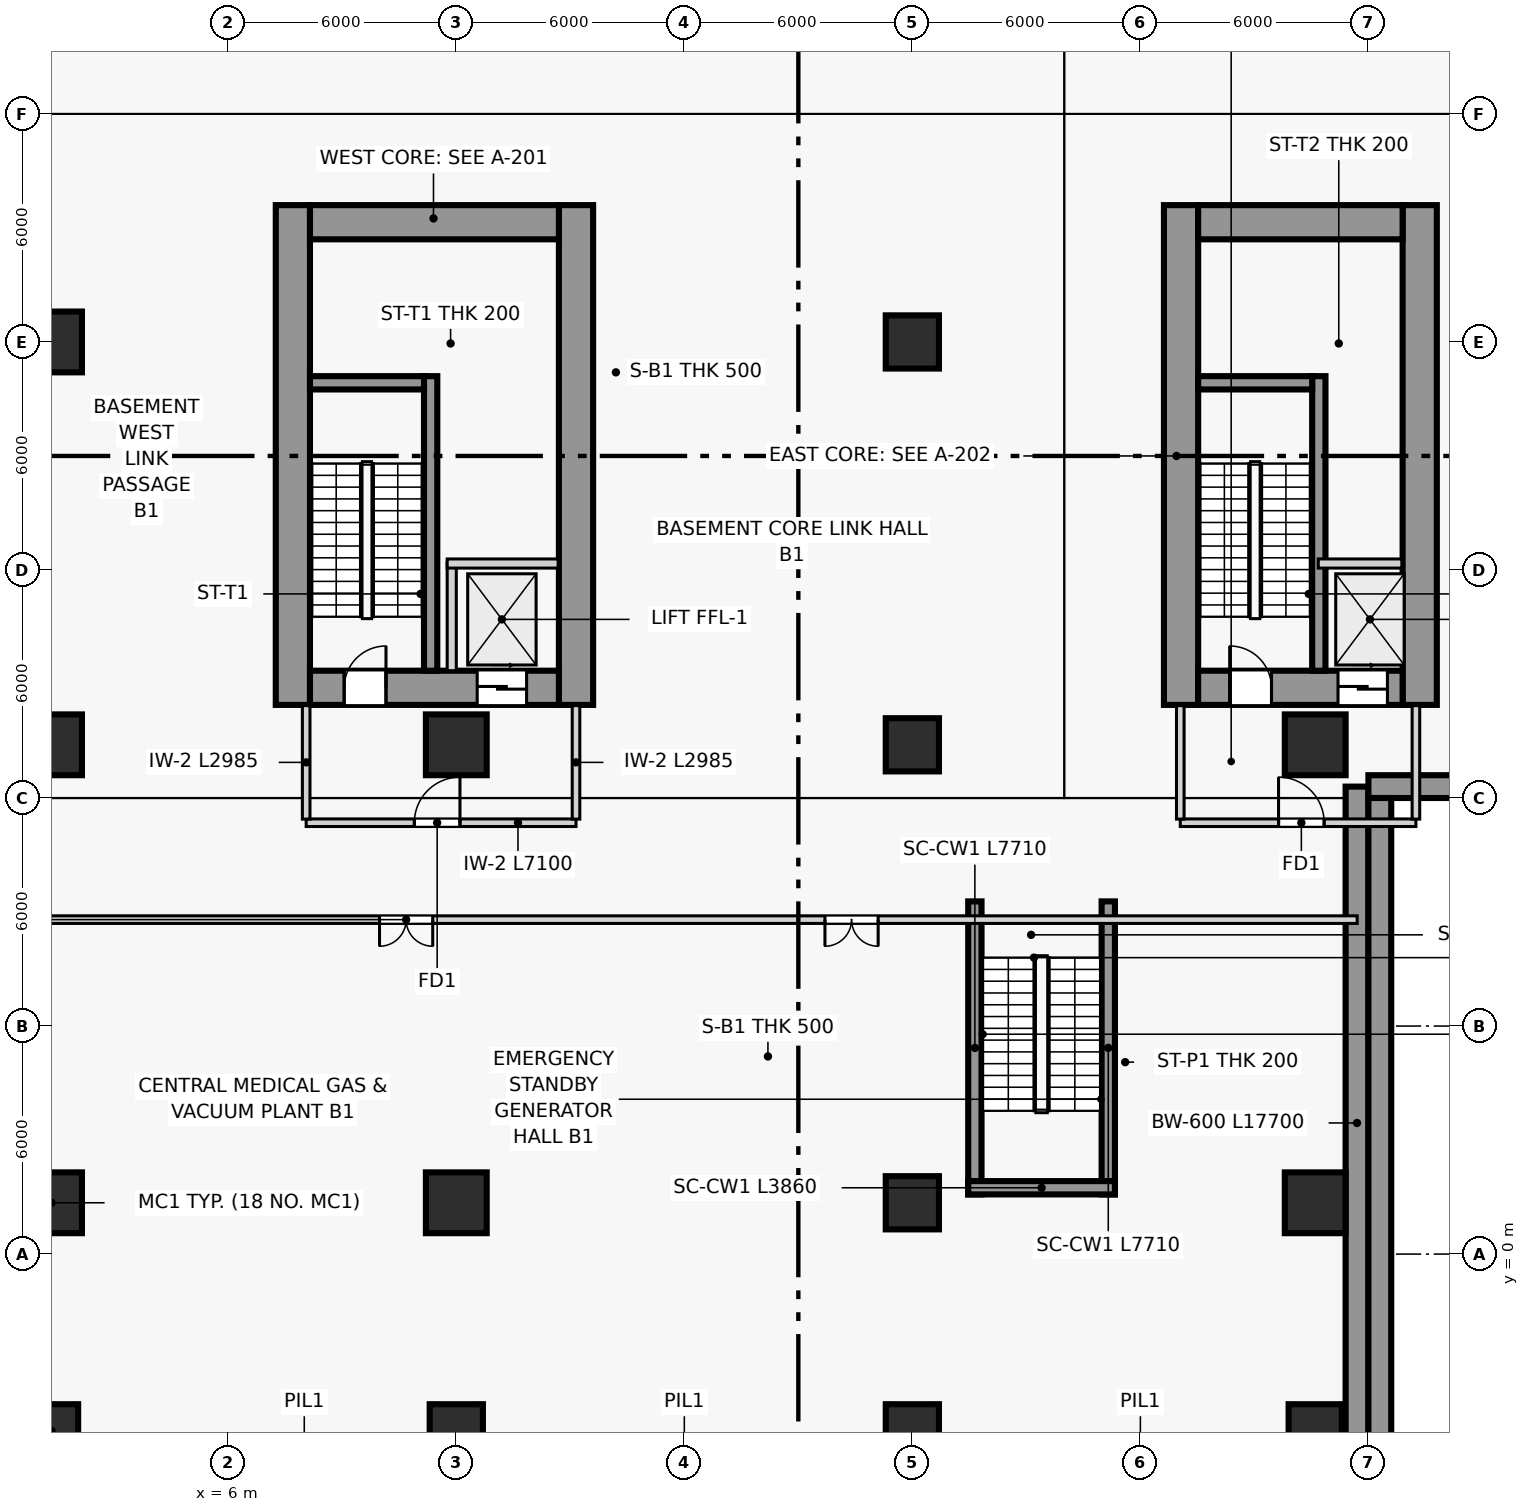
"""IFC4 building model, lengths in metres.
Left out: names, types, materials, properties, quantities, classifications, styles, units other than length and angle.
Written with IfcOpenShell. Run it as: python <this file> out.ifc"""

import sys

from ifc_helpers import new_model, si_unit, direction, frame, frame_2d, origin, origin_2d, place, context, subcontext, project, spatial, rectangle, extrude, source, transform, mapped, element, fill, save


model = new_model("IFC4")
c1 = context("Model", 3, precision=1e-05, world=origin(), true_north=direction((0.0, 1.0)))
c2 = subcontext(c1, "Body", "Model", "MODEL_VIEW")
j1 = project(units=[si_unit("LENGTHUNIT", "METRE"), si_unit("PLANEANGLEUNIT", "RADIAN")], contexts=[c1])
p1 = place(None, origin())
s1 = spatial("IfcSite", under=j1, at=p1, CompositionType="ELEMENT")
p2 = place(p1, origin())
s2 = spatial("IfcBuilding", under=s1, at=p2, CompositionType="ELEMENT")
p3 = place(p2, frame((0.0, 0.0, -4.5)))
s3 = spatial("IfcBuildingStorey", under=s2, at=p3, CompositionType="ELEMENT", Elevation=-4.5)
p4 = place(p3, frame((35.7, -5.4, 0.0), z_axis=(0.0, 0.0, 1.0), x_axis=(0.0, 1.0, 0.0)))
e1 = element("IfcWall", 1, at=p4, inside=s3, PredefinedType="SOLIDWALL", context=c2, shape_type="SweptSolid", body=[
    extrude(rectangle(XDim=17.7, YDim=0.6, at=frame_2d((8.85, 0.0))), origin(), (0.0, 0.0, 1.0), 4.16),
])
p5 = place(p3, frame((36.0, 12.3, 0.0), z_axis=(0.0, 0.0, 1.0), x_axis=(1.0, 0.0, 0.0)))
e2 = element("IfcWall", 2, at=p5, inside=s3, PredefinedType="SOLIDWALL", context=c2, shape_type="SweptSolid", body=[
    extrude(rectangle(XDim=20.0, YDim=0.6, at=frame_2d((10.0, 0.0))), origin(), (0.0, 0.0, 1.0), 4.16),
])
p6 = place(p3, frame((36.3, -9.7, 0.0), z_axis=(0.0, 0.0, 1.0), x_axis=(0.0, 1.0, 0.0)))
e3 = element("IfcWall", 3, at=p6, inside=s3, PredefinedType="SOLIDWALL", context=c2, shape_type="SweptSolid", body=[
    extrude(rectangle(XDim=21.7, YDim=0.6, at=frame_2d((10.85, 0.0))), origin(), (0.0, 0.0, 1.0), 4.26),
])
for number, where, z_axis, x_axis in (
    (4, (7.7, 14.45, 0.0), (0.0, 0.0, 1.0), (0.0, 1.0, 0.0)),
    (5, (15.15, 14.45, 0.0), (0.0, 0.0, 1.0), (0.0, 1.0, 0.0)),
):
    element("IfcWall", number, at=place(p3, frame(where, z_axis=z_axis, x_axis=x_axis)), inside=s3, PredefinedType="SHEAR", context=c2, shape_type="SweptSolid", body=[
        extrude(rectangle(XDim=13.15, YDim=0.9, at=frame_2d((6.575, 0.0))), origin(), (0.0, 0.0, 1.0), 4.5),
    ])
p7 = place(p3, frame((8.15, 14.9, 0.0), z_axis=(0.0, 0.0, 1.0), x_axis=(1.0, 0.0, 0.0)))
e6 = element("IfcWall", 6, at=p7, inside=s3, PredefinedType="SHEAR", context=c2, shape_type="SweptSolid", body=[
    extrude(rectangle(XDim=6.55, YDim=0.9, at=frame_2d((3.275, 0.0))), origin(), (0.0, 0.0, 1.0), 4.5),
])
p8 = place(p7, frame((0.9, 0.0, 0.0)))
e7 = element("IfcOpeningElement", 7, at=p8, cuts=e6, PredefinedType="OPENING", context=c2, shape_type="SweptSolid", body=[
    extrude(rectangle(XDim=1.1, YDim=2.2, at=frame_2d((0.55, 1.1))), frame((0.0, 0.46, 0.0), z_axis=(0.0, -1.0, 0.0), x_axis=(1.0, 0.0, 0.0)), (0.0, 0.0, 1.0), 0.92),
])
p9 = place(p7, frame((4.4, 0.0, 0.0)))
e8 = element("IfcOpeningElement", 8, at=p9, cuts=e6, PredefinedType="OPENING", context=c2, shape_type="SweptSolid", body=[
    extrude(rectangle(XDim=1.3, YDim=2.2, at=frame_2d((0.65, 1.1))), frame((0.0, 0.46, 0.0), z_axis=(0.0, -1.0, 0.0), x_axis=(1.0, 0.0, 0.0)), (0.0, 0.0, 1.0), 0.92),
])
p10 = place(p3, frame((8.15, 27.15, 0.0), z_axis=(0.0, 0.0, 1.0), x_axis=(1.0, 0.0, 0.0)))
e9 = element("IfcWall", 9, at=p10, inside=s3, PredefinedType="SHEAR", context=c2, shape_type="SweptSolid", body=[
    extrude(rectangle(XDim=6.55, YDim=0.9, at=frame_2d((3.275, 0.0))), origin(), (0.0, 0.0, 1.0), 4.5),
])
for number, where, z_axis, x_axis in (
    (10, (31.07, 14.45, 0.0), (0.0, 0.0, 1.0), (0.0, 1.0, 0.0)),
    (11, (37.35, 14.45, 0.0), (0.0, 0.0, 1.0), (0.0, 1.0, 0.0)),
):
    element("IfcWall", number, at=place(p3, frame(where, z_axis=z_axis, x_axis=x_axis)), inside=s3, PredefinedType="SHEAR", context=c2, shape_type="SweptSolid", body=[
        extrude(rectangle(XDim=13.15, YDim=0.9, at=frame_2d((6.575, 0.0))), origin(), (0.0, 0.0, 1.0), 4.5),
    ])
p11 = place(p3, frame((31.52, 14.9, 0.0), z_axis=(0.0, 0.0, 1.0), x_axis=(1.0, 0.0, 0.0)))
e12 = element("IfcWall", 12, at=p11, inside=s3, PredefinedType="SHEAR", context=c2, shape_type="SweptSolid", body=[
    extrude(rectangle(XDim=5.38, YDim=0.9, at=frame_2d((2.69, 0.0))), origin(), (0.0, 0.0, 1.0), 4.5),
])
p12 = place(p11, frame((0.83, 0.0, 0.0)))
e13 = element("IfcOpeningElement", 13, at=p12, cuts=e12, PredefinedType="OPENING", context=c2, shape_type="SweptSolid", body=[
    extrude(rectangle(XDim=1.1, YDim=2.2, at=frame_2d((0.55, 1.1))), frame((0.0, 0.46, 0.0), z_axis=(0.0, -1.0, 0.0), x_axis=(1.0, 0.0, 0.0)), (0.0, 0.0, 1.0), 0.92),
])
p13 = place(p11, frame((3.68, 0.0, 0.0)))
e14 = element("IfcOpeningElement", 14, at=p13, cuts=e12, PredefinedType="OPENING", context=c2, shape_type="SweptSolid", body=[
    extrude(rectangle(XDim=1.3, YDim=2.2, at=frame_2d((0.65, 1.1))), frame((0.0, 0.46, 0.0), z_axis=(0.0, -1.0, 0.0), x_axis=(1.0, 0.0, 0.0)), (0.0, 0.0, 1.0), 0.92),
])
p14 = place(p3, frame((31.52, 27.15, 0.0), z_axis=(0.0, 0.0, 1.0), x_axis=(1.0, 0.0, 0.0)))
e15 = element("IfcWall", 15, at=p14, inside=s3, PredefinedType="SHEAR", context=c2, shape_type="SweptSolid", body=[
    extrude(rectangle(XDim=5.38, YDim=0.9, at=frame_2d((2.69, 0.0))), origin(), (0.0, 0.0, 1.0), 4.5),
])
p15 = place(p3, frame((11.325, 15.35, 0.0), z_axis=(0.0, 0.0, 1.0), x_axis=(0.0, 1.0, 0.0)))
e16 = element("IfcWall", 16, at=p15, inside=s3, PredefinedType="SHEAR", context=c2, shape_type="SweptSolid", body=[
    extrude(rectangle(XDim=7.75, YDim=0.35, at=frame_2d((3.875, 0.0))), origin(), (0.0, 0.0, 1.0), 4.5),
])
p16 = place(p3, frame((8.15, 22.925, 0.0), z_axis=(0.0, 0.0, 1.0), x_axis=(1.0, 0.0, 0.0)))
e17 = element("IfcWall", 17, at=p16, inside=s3, PredefinedType="SHEAR", context=c2, shape_type="SweptSolid", body=[
    extrude(rectangle(XDim=3.0, YDim=0.35, at=frame_2d((1.5, 0.0))), origin(), (0.0, 0.0, 1.0), 4.5),
])
p17 = place(p3, frame((34.695, 15.35, 0.0), z_axis=(0.0, 0.0, 1.0), x_axis=(0.0, 1.0, 0.0)))
e18 = element("IfcWall", 18, at=p17, inside=s3, PredefinedType="SHEAR", context=c2, shape_type="SweptSolid", body=[
    extrude(rectangle(XDim=7.75, YDim=0.35, at=frame_2d((3.875, 0.0))), origin(), (0.0, 0.0, 1.0), 4.5),
])
p18 = place(p3, frame((31.52, 22.925, 0.0), z_axis=(0.0, 0.0, 1.0), x_axis=(1.0, 0.0, 0.0)))
e19 = element("IfcWall", 19, at=p18, inside=s3, PredefinedType="SHEAR", context=c2, shape_type="SweptSolid", body=[
    extrude(rectangle(XDim=3.0, YDim=0.35, at=frame_2d((1.5, 0.0))), origin(), (0.0, 0.0, 1.0), 4.5),
])
for number, where, z_axis, x_axis in (
    (20, (25.645, 1.57, 0.0), (0.0, 0.0, 1.0), (0.0, 1.0, 0.0)),
    (21, (29.155, 1.57, 0.0), (0.0, 0.0, 1.0), (0.0, 1.0, 0.0)),
):
    element("IfcWall", number, at=place(p3, frame(where, z_axis=z_axis, x_axis=x_axis)), inside=s3, PredefinedType="SHEAR", context=c2, shape_type="SweptSolid", body=[
        extrude(rectangle(XDim=7.71, YDim=0.35, at=frame_2d((3.855, 0.0))), origin(), (0.0, 0.0, 1.0), 4.5),
    ])
p19 = place(p3, frame((25.47, 1.745, 0.0), z_axis=(0.0, 0.0, 1.0), x_axis=(1.0, 0.0, 0.0)))
e22 = element("IfcWall", 22, at=p19, inside=s3, PredefinedType="SHEAR", context=c2, shape_type="SweptSolid", body=[
    extrude(rectangle(XDim=3.86, YDim=0.35, at=frame_2d((1.93, 0.0))), origin(), (0.0, 0.0, 1.0), 4.5),
])
m1 = source(origin(), c2, "Body", "SweptSolid", [
    extrude(rectangle(XDim=1.4, YDim=1.4, at=origin_2d()), origin(), (0.0, 0.0, 1.0), 4.5),
])
p20 = place(p3, frame((1.35, -4.65, 0.0), z_axis=(0.0, 0.0, 1.0), x_axis=(1.0, 0.0, 0.0)))
e23 = element("IfcColumn", 23, at=p20, inside=s3, PredefinedType="COLUMN", context=c2, shape_type="MappedRepresentation", body=[
    mapped(m1, transform((0.0, 0.0, 0.0), scale=1.0)),
])
m2 = source(origin(), c2, "Body", "SweptSolid", [
    extrude(rectangle(XDim=1.6, YDim=1.6, at=origin_2d()), origin(), (0.0, 0.0, 1.0), 4.5),
])
for number, where, z_axis, x_axis in (
    (24, (1.35, 1.35, 0.0), (0.0, 0.0, 1.0), (1.0, 0.0, 0.0)),
    (25, (1.35, 13.4, 0.0), (0.0, 0.0, 1.0), (1.0, 0.0, 0.0)),
    (26, (1.35, 24.0, 0.0), (0.0, 0.0, 1.0), (1.0, 0.0, 0.0)),
):
    element("IfcColumn", number, at=place(p3, frame(where, z_axis=z_axis, x_axis=x_axis)), inside=s3, PredefinedType="COLUMN", context=c2, shape_type="MappedRepresentation", body=[
        mapped(m2, transform((0.0, 0.0, 0.0), scale=1.0)),
    ])
p21 = place(p3, frame((12.0, -4.65, 0.0), z_axis=(0.0, 0.0, 1.0), x_axis=(1.0, 0.0, 0.0)))
e27 = element("IfcColumn", 27, at=p21, inside=s3, PredefinedType="COLUMN", context=c2, shape_type="MappedRepresentation", body=[
    mapped(m1, transform((0.0, 0.0, 0.0), scale=1.0)),
])
for number, where, z_axis, x_axis in (
    (28, (12.0, 1.35, 0.0), (0.0, 0.0, 1.0), (1.0, 0.0, 0.0)),
    (29, (12.0, 13.4, 0.0), (0.0, 0.0, 1.0), (1.0, 0.0, 0.0)),
):
    element("IfcColumn", number, at=place(p3, frame(where, z_axis=z_axis, x_axis=x_axis)), inside=s3, PredefinedType="COLUMN", context=c2, shape_type="MappedRepresentation", body=[
        mapped(m2, transform((0.0, 0.0, 0.0), scale=1.0)),
    ])
for number, where, z_axis, x_axis in (
    (30, (24.0, -4.65, 0.0), (0.0, 0.0, 1.0), (1.0, 0.0, 0.0)),
    (31, (24.0, 1.35, 0.0), (0.0, 0.0, 1.0), (1.0, 0.0, 0.0)),
    (32, (24.0, 13.4, 0.0), (0.0, 0.0, 1.0), (1.0, 0.0, 0.0)),
    (33, (24.0, 24.0, 0.0), (0.0, 0.0, 1.0), (1.0, 0.0, 0.0)),
    (34, (34.6, -4.65, 0.0), (0.0, 0.0, 1.0), (1.0, 0.0, 0.0)),
):
    element("IfcColumn", number, at=place(p3, frame(where, z_axis=z_axis, x_axis=x_axis)), inside=s3, PredefinedType="COLUMN", context=c2, shape_type="MappedRepresentation", body=[
        mapped(m1, transform((0.0, 0.0, 0.0), scale=1.0)),
    ])
for number, where, z_axis, x_axis in (
    (35, (34.6, 1.35, 0.0), (0.0, 0.0, 1.0), (1.0, 0.0, 0.0)),
    (36, (34.6, 13.4, 0.0), (0.0, 0.0, 1.0), (1.0, 0.0, 0.0)),
):
    element("IfcColumn", number, at=place(p3, frame(where, z_axis=z_axis, x_axis=x_axis)), inside=s3, PredefinedType="COLUMN", context=c2, shape_type="MappedRepresentation", body=[
        mapped(m2, transform((0.0, 0.0, 0.0), scale=1.0)),
    ])
p22 = place(p3, frame((11.88, 15.35, 0.0), z_axis=(0.0, 0.0, 1.0), x_axis=(0.0, 1.0, 0.0)))
e37 = element("IfcWall", 37, at=p22, inside=s3, PredefinedType="PARTITIONING", context=c2, shape_type="SweptSolid", body=[
    extrude(rectangle(XDim=2.85, YDim=0.24, at=frame_2d((1.425, 0.0))), origin(), (0.0, 0.0, 1.0), 4.16),
])
p23 = place(p3, frame((11.76, 18.17, 0.0), z_axis=(0.0, 0.0, 1.0), x_axis=(1.0, 0.0, 0.0)))
e38 = element("IfcWall", 38, at=p23, inside=s3, PredefinedType="PARTITIONING", context=c2, shape_type="SweptSolid", body=[
    extrude(rectangle(XDim=2.92, YDim=0.24, at=frame_2d((1.46, 0.0))), origin(), (0.0, 0.0, 1.0), 4.16),
])
p24 = place(p3, frame((34.68, 18.17, 0.0), z_axis=(0.0, 0.0, 1.0), x_axis=(1.0, 0.0, 0.0)))
e39 = element("IfcWall", 39, at=p24, inside=s3, PredefinedType="PARTITIONING", context=c2, shape_type="SweptSolid", body=[
    extrude(rectangle(XDim=2.2, YDim=0.24, at=frame_2d((1.1, 0.0))), origin(), (0.0, 0.0, 1.0), 4.16),
])
p25 = place(p3, frame((8.05, 11.35, 0.0), z_axis=(0.0, 0.0, 1.0), x_axis=(1.0, 0.0, 0.0)))
e40 = element("IfcWall", 40, at=p25, inside=s3, PredefinedType="PARTITIONING", context=c2, shape_type="SweptSolid", body=[
    extrude(rectangle(XDim=7.1, YDim=0.2, at=frame_2d((3.55, 0.0))), origin(), (0.0, 0.0, 1.0), 4.16),
])
p26 = place(p25, frame((2.846, 0.0, 0.0)))
e41 = element("IfcOpeningElement", 41, at=p26, cuts=e40, PredefinedType="OPENING", context=c2, shape_type="SweptSolid", body=[
    extrude(rectangle(XDim=1.2, YDim=2.2, at=frame_2d((0.6, 1.1))), frame((0.0, 0.11, 0.0), z_axis=(0.0, -1.0, 0.0), x_axis=(1.0, 0.0, 0.0)), (0.0, 0.0, 1.0), 0.22),
])
for number, where, z_axis, x_axis in (
    (42, (8.05, 11.445, 0.0), (0.0, 0.0, 1.0), (0.0, 1.0, 0.0)),
    (43, (15.15, 11.445, 0.0), (0.0, 0.0, 1.0), (0.0, 1.0, 0.0)),
):
    element("IfcWall", number, at=place(p3, frame(where, z_axis=z_axis, x_axis=x_axis)), inside=s3, PredefinedType="PARTITIONING", context=c2, shape_type="SweptSolid", body=[
        extrude(rectangle(XDim=2.985, YDim=0.2, at=frame_2d((1.492, 0.0))), origin(), (0.0, 0.0, 1.0), 4.16),
    ])
p27 = place(p3, frame((31.05, 11.35, 0.0), z_axis=(0.0, 0.0, 1.0), x_axis=(1.0, 0.0, 0.0)))
e44 = element("IfcWall", 44, at=p27, inside=s3, PredefinedType="PARTITIONING", context=c2, shape_type="SweptSolid", body=[
    extrude(rectangle(XDim=6.2, YDim=0.2, at=frame_2d((3.1, 0.0))), origin(), (0.0, 0.0, 1.0), 4.16),
])
p28 = place(p27, frame((2.586, 0.0, 0.0)))
e45 = element("IfcOpeningElement", 45, at=p28, cuts=e44, PredefinedType="OPENING", context=c2, shape_type="SweptSolid", body=[
    extrude(rectangle(XDim=1.2, YDim=2.2, at=frame_2d((0.6, 1.1))), frame((0.0, 0.11, 0.0), z_axis=(0.0, -1.0, 0.0), x_axis=(1.0, 0.0, 0.0)), (0.0, 0.0, 1.0), 0.22),
])
for number, where, z_axis, x_axis in (
    (46, (31.05, 11.445, 0.0), (0.0, 0.0, 1.0), (0.0, 1.0, 0.0)),
    (47, (37.25, 11.445, 0.0), (0.0, 0.0, 1.0), (0.0, 1.0, 0.0)),
):
    element("IfcWall", number, at=place(p3, frame(where, z_axis=z_axis, x_axis=x_axis)), inside=s3, PredefinedType="PARTITIONING", context=c2, shape_type="SweptSolid", body=[
        extrude(rectangle(XDim=2.985, YDim=0.2, at=frame_2d((1.492, 0.0))), origin(), (0.0, 0.0, 1.0), 4.16),
    ])
p29 = place(p3, frame((0.295, 8.8, 0.0), z_axis=(0.0, 0.0, 1.0), x_axis=(1.0, 0.0, 0.0)))
e48 = element("IfcWall", 48, at=p29, inside=s3, PredefinedType="PARTITIONING", context=c2, shape_type="SweptSolid", body=[
    extrude(rectangle(XDim=35.41, YDim=0.2, at=frame_2d((17.705, 0.0))), origin(), (0.0, 0.0, 1.0), 4.16),
])
p30 = place(p29, frame((9.685, 0.0, 0.0)))
e49 = element("IfcOpeningElement", 49, at=p30, cuts=e48, PredefinedType="OPENING", context=c2, shape_type="SweptSolid", body=[
    extrude(rectangle(XDim=1.4, YDim=2.2, at=frame_2d((0.7, 1.1))), frame((0.0, 0.11, 0.0), z_axis=(0.0, -1.0, 0.0), x_axis=(1.0, 0.0, 0.0)), (0.0, 0.0, 1.0), 0.22),
])
p31 = place(p29, frame((21.405, 0.0, 0.0)))
e50 = element("IfcOpeningElement", 50, at=p31, cuts=e48, PredefinedType="OPENING", context=c2, shape_type="SweptSolid", body=[
    extrude(rectangle(XDim=1.4, YDim=2.2, at=frame_2d((0.7, 1.1))), frame((0.0, 0.11, 0.0), z_axis=(0.0, -1.0, 0.0), x_axis=(1.0, 0.0, 0.0)), (0.0, 0.0, 1.0), 0.22),
])
m3 = source(origin(), c2, "Body", "SweptSolid", [
    extrude(rectangle(XDim=1.1, YDim=2.2, at=frame_2d((0.55, 1.1))), frame((0.0, 0.025, 0.0), z_axis=(0.0, -1.0, 0.0), x_axis=(1.0, 0.0, 0.0)), (0.0, 0.0, 1.0), 0.05),
])
p32 = place(p8, origin())
e51 = element("IfcDoor", 51, at=p32, inside=s3, OperationType="SINGLE_SWING_RIGHT", PredefinedType="DOOR", context=c2, shape_type="MappedRepresentation", body=[
    mapped(m3, transform((0.0, 0.0, 0.0), scale=1.0)),
])
fill(e7, e51)
p33 = place(p12, origin())
e52 = element("IfcDoor", 52, at=p33, inside=s3, OperationType="SINGLE_SWING_LEFT", PredefinedType="DOOR", context=c2, shape_type="MappedRepresentation", body=[
    mapped(m3, transform((0.0, 0.0, 0.0), scale=1.0)),
])
fill(e13, e52)
m4 = source(origin(), c2, "Body", "SweptSolid", [
    extrude(rectangle(XDim=1.3, YDim=2.2, at=frame_2d((0.65, 1.1))), frame((0.0, 0.025, 0.0), z_axis=(0.0, -1.0, 0.0), x_axis=(1.0, 0.0, 0.0)), (0.0, 0.0, 1.0), 0.05),
])
p34 = place(p9, origin())
e53 = element("IfcDoor", 53, at=p34, inside=s3, OperationType="SLIDING_TO_RIGHT", PredefinedType="DOOR", context=c2, shape_type="MappedRepresentation", body=[
    mapped(m4, transform((0.0, 0.0, 0.0), scale=1.0)),
])
fill(e8, e53)
p35 = place(p13, origin())
e54 = element("IfcDoor", 54, at=p35, inside=s3, OperationType="SLIDING_TO_RIGHT", PredefinedType="DOOR", context=c2, shape_type="MappedRepresentation", body=[
    mapped(m4, transform((0.0, 0.0, 0.0), scale=1.0)),
])
fill(e14, e54)
m5 = source(origin(), c2, "Body", "SweptSolid", [
    extrude(rectangle(XDim=1.2, YDim=2.2, at=frame_2d((0.6, 1.1))), frame((0.0, 0.025, 0.0), z_axis=(0.0, -1.0, 0.0), x_axis=(1.0, 0.0, 0.0)), (0.0, 0.0, 1.0), 0.05),
])
p36 = place(p26, origin())
e55 = element("IfcDoor", 55, at=p36, inside=s3, OperationType="SINGLE_SWING_RIGHT", PredefinedType="DOOR", context=c2, shape_type="MappedRepresentation", body=[
    mapped(m5, transform((0.0, 0.0, 0.0), scale=1.0)),
])
fill(e41, e55)
p37 = place(p28, origin())
e56 = element("IfcDoor", 56, at=p37, inside=s3, OperationType="SINGLE_SWING_LEFT", PredefinedType="DOOR", context=c2, shape_type="MappedRepresentation", body=[
    mapped(m5, transform((0.0, 0.0, 0.0), scale=1.0)),
])
fill(e45, e56)
m6 = source(origin(), c2, "Body", "SweptSolid", [
    extrude(rectangle(XDim=1.4, YDim=2.2, at=frame_2d((0.7, 1.1))), frame((0.0, 0.025, 0.0), z_axis=(0.0, -1.0, 0.0), x_axis=(1.0, 0.0, 0.0)), (0.0, 0.0, 1.0), 0.05),
])
p38 = place(p30, frame((1.4, 0.0, 0.0), z_axis=(0.0, 0.0, 1.0), x_axis=(-1.0, 0.0, 0.0)))
e57 = element("IfcDoor", 57, at=p38, inside=s3, OperationType="DOUBLE_DOOR_SINGLE_SWING", PredefinedType="DOOR", context=c2, shape_type="MappedRepresentation", body=[
    mapped(m6, transform((0.0, 0.0, 0.0), scale=1.0)),
])
fill(e49, e57)
p39 = place(p31, frame((1.4, 0.0, 0.0), z_axis=(0.0, 0.0, 1.0), x_axis=(-1.0, 0.0, 0.0)))
e58 = element("IfcDoor", 58, at=p39, inside=s3, OperationType="DOUBLE_DOOR_SINGLE_SWING", PredefinedType="DOOR", context=c2, shape_type="MappedRepresentation", body=[
    mapped(m6, transform((0.0, 0.0, 0.0), scale=1.0)),
])
fill(e50, e58)
save(model, sys.argv[1])
